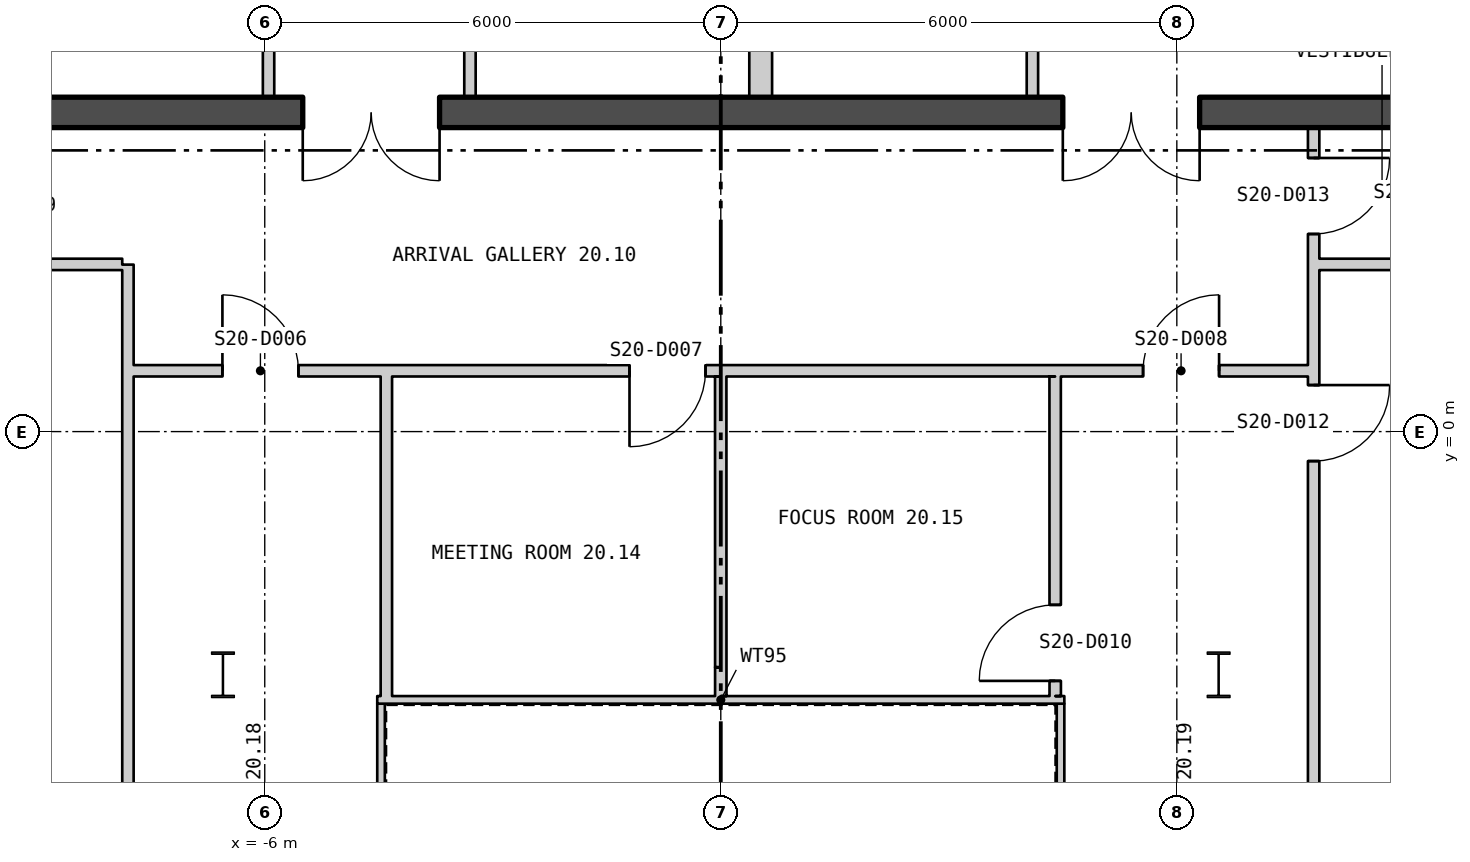
"""IFC4 building model, lengths in metres.
Left out: names, types, materials, properties, quantities, classifications, styles, units other than length and angle.
Written with IfcOpenShell. Run it as: python <this file> out.ifc"""

import sys

from ifc_helpers import new_model, si_unit, direction, frame, frame_2d, origin, origin_2d, place, context, subcontext, project, spatial, polyline, rectangle, i_section, outline, extrude, element, fill, save


model = new_model("IFC4")
c1 = context("Model", 3, precision=1e-05, world=origin(), true_north=direction((0.0, 1.0)))
c2 = subcontext(c1, "Body", "Model", "MODEL_VIEW")
j1 = project(units=[si_unit("LENGTHUNIT", "METRE"), si_unit("PLANEANGLEUNIT", "RADIAN")], contexts=[c1])
p1 = place(None, origin())
s1 = spatial("IfcSite", under=j1, at=p1, CompositionType="ELEMENT")
p2 = place(p1, origin())
s2 = spatial("IfcBuilding", under=s1, at=p2, CompositionType="ELEMENT")
p3 = place(p2, frame((0.0, 0.0, 268.8)))
s3 = spatial("IfcBuildingStorey", under=s2, at=p3, CompositionType="ELEMENT", Elevation=268.8)
for number, where, z_axis, x_axis in (
    (1, (6.55, -3.2, 0.0), (0.0, 0.0, 1.0), (1.0, 0.0, 0.0)),
    (2, (-6.55, -3.2, 0.0), (0.0, 0.0, 1.0), (1.0, 0.0, 0.0)),
):
    element("IfcColumn", number, at=place(p3, frame(where, z_axis=z_axis, x_axis=x_axis)), inside=s3, PredefinedType="COLUMN", context=c2, shape_type="SweptSolid", body=[
        extrude(i_section(OverallWidth=0.3, OverallDepth=0.6, WebThickness=0.015, FlangeThickness=0.03, at=origin_2d()), origin(), (0.0, 0.0, 1.0), 3.9),
    ])
p4 = place(p3, frame((-25.54, 15.35, -0.18), z_axis=(0.0, 0.0, 1.0), x_axis=(0.499999764979, -0.866025539474, 0.0)))
e3 = element("IfcWall", 3, at=p4, inside=s3, PredefinedType="SOLIDWALL", context=c2, shape_type="SweptSolid", body=[
    extrude(outline(polyline([(-0.13, -0.225), (45.87, -0.225), (45.61, 0.225), (0.13, 0.225), (-0.13, -0.225)])), origin(), (0.0, 0.0, 1.0), 3.68),
])
p5 = place(p4, frame((1.424, 0.0, 1.08)))
e4 = element("IfcOpeningElement", 4, at=p5, cuts=e3, PredefinedType="OPENING", context=c2, shape_type="SweptSolid", body=[
    extrude(rectangle(XDim=2.4, YDim=2.0, at=frame_2d((1.2, 1.0))), frame((0.0, 0.235, 0.0), z_axis=(0.0, -1.0, 0.0), x_axis=(1.0, 0.0, 0.0)), (0.0, 0.0, 1.0), 0.47),
])
p6 = place(p4, frame((5.893, 0.0, 1.08)))
e5 = element("IfcOpeningElement", 5, at=p6, cuts=e3, PredefinedType="OPENING", context=c2, shape_type="SweptSolid", body=[
    extrude(rectangle(XDim=2.4, YDim=2.0, at=frame_2d((1.2, 1.0))), frame((0.0, 0.235, 0.0), z_axis=(0.0, -1.0, 0.0), x_axis=(1.0, 0.0, 0.0)), (0.0, 0.0, 1.0), 0.47),
])
p7 = place(p4, frame((10.401, 0.0, 1.08)))
e6 = element("IfcOpeningElement", 6, at=p7, cuts=e3, PredefinedType="OPENING", context=c2, shape_type="SweptSolid", body=[
    extrude(rectangle(XDim=2.4, YDim=2.0, at=frame_2d((1.2, 1.0))), frame((0.0, 0.235, 0.0), z_axis=(0.0, -1.0, 0.0), x_axis=(1.0, 0.0, 0.0)), (0.0, 0.0, 1.0), 0.47),
])
p8 = place(p4, frame((14.909, 0.0, 1.08)))
e7 = element("IfcOpeningElement", 7, at=p8, cuts=e3, PredefinedType="OPENING", context=c2, shape_type="SweptSolid", body=[
    extrude(rectangle(XDim=2.4, YDim=2.0, at=frame_2d((1.2, 1.0))), frame((0.0, 0.235, 0.0), z_axis=(0.0, -1.0, 0.0), x_axis=(1.0, 0.0, 0.0)), (0.0, 0.0, 1.0), 0.47),
])
p9 = place(p4, frame((19.416, 0.0, 1.08)))
e8 = element("IfcOpeningElement", 8, at=p9, cuts=e3, PredefinedType="OPENING", context=c2, shape_type="SweptSolid", body=[
    extrude(rectangle(XDim=2.4, YDim=2.0, at=frame_2d((1.2, 1.0))), frame((0.0, 0.235, 0.0), z_axis=(0.0, -1.0, 0.0), x_axis=(1.0, 0.0, 0.0)), (0.0, 0.0, 1.0), 0.47),
])
p10 = place(p4, frame((23.924, 0.0, 1.08)))
e9 = element("IfcOpeningElement", 9, at=p10, cuts=e3, PredefinedType="OPENING", context=c2, shape_type="SweptSolid", body=[
    extrude(rectangle(XDim=2.4, YDim=2.0, at=frame_2d((1.2, 1.0))), frame((0.0, 0.235, 0.0), z_axis=(0.0, -1.0, 0.0), x_axis=(1.0, 0.0, 0.0)), (0.0, 0.0, 1.0), 0.47),
])
p11 = place(p4, frame((28.431, 0.0, 1.08)))
e10 = element("IfcOpeningElement", 10, at=p11, cuts=e3, PredefinedType="OPENING", context=c2, shape_type="SweptSolid", body=[
    extrude(rectangle(XDim=2.4, YDim=2.0, at=frame_2d((1.2, 1.0))), frame((0.0, 0.235, 0.0), z_axis=(0.0, -1.0, 0.0), x_axis=(1.0, 0.0, 0.0)), (0.0, 0.0, 1.0), 0.47),
])
p12 = place(p4, frame((32.939, 0.0, 1.08)))
e11 = element("IfcOpeningElement", 11, at=p12, cuts=e3, PredefinedType="OPENING", context=c2, shape_type="SweptSolid", body=[
    extrude(rectangle(XDim=2.4, YDim=2.0, at=frame_2d((1.2, 1.0))), frame((0.0, 0.235, 0.0), z_axis=(0.0, -1.0, 0.0), x_axis=(1.0, 0.0, 0.0)), (0.0, 0.0, 1.0), 0.47),
])
p13 = place(p4, frame((37.447, 0.0, 1.08)))
e12 = element("IfcOpeningElement", 12, at=p13, cuts=e3, PredefinedType="OPENING", context=c2, shape_type="SweptSolid", body=[
    extrude(rectangle(XDim=2.4, YDim=2.0, at=frame_2d((1.2, 1.0))), frame((0.0, 0.235, 0.0), z_axis=(0.0, -1.0, 0.0), x_axis=(1.0, 0.0, 0.0)), (0.0, 0.0, 1.0), 0.47),
])
p14 = place(p4, frame((41.916, 0.0, 1.08)))
e13 = element("IfcOpeningElement", 13, at=p14, cuts=e3, PredefinedType="OPENING", context=c2, shape_type="SweptSolid", body=[
    extrude(rectangle(XDim=2.4, YDim=2.0, at=frame_2d((1.2, 1.0))), frame((0.0, 0.235, 0.0), z_axis=(0.0, -1.0, 0.0), x_axis=(1.0, 0.0, 0.0)), (0.0, 0.0, 1.0), 0.47),
])
p15 = place(p3, frame((2.67, -24.262, -0.18), z_axis=(0.0, 0.0, 1.0), x_axis=(0.499999764979, 0.866025539474, 0.0)))
e14 = element("IfcWall", 14, at=p15, inside=s3, PredefinedType="SOLIDWALL", context=c2, shape_type="SweptSolid", body=[
    extrude(outline(polyline([(-0.13, -0.225), (45.87, -0.225), (45.61, 0.225), (0.13, 0.225), (-0.13, -0.225)])), origin(), (0.0, 0.0, 1.0), 3.68),
])
p16 = place(p15, frame((1.424, 0.0, 1.08)))
e15 = element("IfcOpeningElement", 15, at=p16, cuts=e14, PredefinedType="OPENING", context=c2, shape_type="SweptSolid", body=[
    extrude(rectangle(XDim=2.4, YDim=2.0, at=frame_2d((1.2, 1.0))), frame((0.0, 0.235, 0.0), z_axis=(0.0, -1.0, 0.0), x_axis=(1.0, 0.0, 0.0)), (0.0, 0.0, 1.0), 0.47),
])
p17 = place(p15, frame((5.893, 0.0, 1.08)))
e16 = element("IfcOpeningElement", 16, at=p17, cuts=e14, PredefinedType="OPENING", context=c2, shape_type="SweptSolid", body=[
    extrude(rectangle(XDim=2.4, YDim=2.0, at=frame_2d((1.2, 1.0))), frame((0.0, 0.235, 0.0), z_axis=(0.0, -1.0, 0.0), x_axis=(1.0, 0.0, 0.0)), (0.0, 0.0, 1.0), 0.47),
])
p18 = place(p15, frame((10.401, 0.0, 1.08)))
e17 = element("IfcOpeningElement", 17, at=p18, cuts=e14, PredefinedType="OPENING", context=c2, shape_type="SweptSolid", body=[
    extrude(rectangle(XDim=2.4, YDim=2.0, at=frame_2d((1.2, 1.0))), frame((0.0, 0.235, 0.0), z_axis=(0.0, -1.0, 0.0), x_axis=(1.0, 0.0, 0.0)), (0.0, 0.0, 1.0), 0.47),
])
p19 = place(p15, frame((14.909, 0.0, 1.08)))
e18 = element("IfcOpeningElement", 18, at=p19, cuts=e14, PredefinedType="OPENING", context=c2, shape_type="SweptSolid", body=[
    extrude(rectangle(XDim=2.4, YDim=2.0, at=frame_2d((1.2, 1.0))), frame((0.0, 0.235, 0.0), z_axis=(0.0, -1.0, 0.0), x_axis=(1.0, 0.0, 0.0)), (0.0, 0.0, 1.0), 0.47),
])
p20 = place(p15, frame((23.924, 0.0, 1.08)))
e19 = element("IfcOpeningElement", 19, at=p20, cuts=e14, PredefinedType="OPENING", context=c2, shape_type="SweptSolid", body=[
    extrude(rectangle(XDim=2.4, YDim=2.0, at=frame_2d((1.2, 1.0))), frame((0.0, 0.235, 0.0), z_axis=(0.0, -1.0, 0.0), x_axis=(1.0, 0.0, 0.0)), (0.0, 0.0, 1.0), 0.47),
])
p21 = place(p15, frame((28.431, 0.0, 1.08)))
e20 = element("IfcOpeningElement", 20, at=p21, cuts=e14, PredefinedType="OPENING", context=c2, shape_type="SweptSolid", body=[
    extrude(rectangle(XDim=2.4, YDim=2.0, at=frame_2d((1.2, 1.0))), frame((0.0, 0.235, 0.0), z_axis=(0.0, -1.0, 0.0), x_axis=(1.0, 0.0, 0.0)), (0.0, 0.0, 1.0), 0.47),
])
p22 = place(p15, frame((32.939, 0.0, 1.08)))
e21 = element("IfcOpeningElement", 21, at=p22, cuts=e14, PredefinedType="OPENING", context=c2, shape_type="SweptSolid", body=[
    extrude(rectangle(XDim=2.4, YDim=2.0, at=frame_2d((1.2, 1.0))), frame((0.0, 0.235, 0.0), z_axis=(0.0, -1.0, 0.0), x_axis=(1.0, 0.0, 0.0)), (0.0, 0.0, 1.0), 0.47),
])
p23 = place(p15, frame((37.447, 0.0, 1.08)))
e22 = element("IfcOpeningElement", 22, at=p23, cuts=e14, PredefinedType="OPENING", context=c2, shape_type="SweptSolid", body=[
    extrude(rectangle(XDim=2.4, YDim=2.0, at=frame_2d((1.2, 1.0))), frame((0.0, 0.235, 0.0), z_axis=(0.0, -1.0, 0.0), x_axis=(1.0, 0.0, 0.0)), (0.0, 0.0, 1.0), 0.47),
])
p24 = place(p15, frame((41.916, 0.0, 1.08)))
e23 = element("IfcOpeningElement", 23, at=p24, cuts=e14, PredefinedType="OPENING", context=c2, shape_type="SweptSolid", body=[
    extrude(rectangle(XDim=2.4, YDim=2.0, at=frame_2d((1.2, 1.0))), frame((0.0, 0.235, 0.0), z_axis=(0.0, -1.0, 0.0), x_axis=(1.0, 0.0, 0.0)), (0.0, 0.0, 1.0), 0.47),
])
p25 = place(p3, frame((4.47, -11.62, 0.0), z_axis=(0.0, 0.0, 1.0), x_axis=(0.0, 1.0, 0.0)))
e24 = element("IfcWall", 24, at=p25, inside=s3, PredefinedType="PARTITIONING", context=c2, shape_type="SweptSolid", body=[
    extrude(rectangle(XDim=8.04, YDim=0.1, at=frame_2d((4.02, 0.0))), origin(), (0.0, 0.0, 1.0), 3.7),
])
p26 = place(p3, frame((4.52, -3.53, 0.0), z_axis=(0.0, 0.0, 1.0), x_axis=(-1.0, 0.0, 0.0)))
e25 = element("IfcWall", 25, at=p26, inside=s3, PredefinedType="PARTITIONING", context=c2, shape_type="SweptSolid", body=[
    extrude(rectangle(XDim=9.04, YDim=0.1, at=frame_2d((4.52, 0.0))), origin(), (0.0, 0.0, 1.0), 3.7),
])
p27 = place(p3, frame((-4.47, -3.58, 0.0), z_axis=(0.0, 0.0, 1.0), x_axis=(0.0, -1.0, 0.0)))
e26 = element("IfcWall", 26, at=p27, inside=s3, PredefinedType="PARTITIONING", context=c2, shape_type="SweptSolid", body=[
    extrude(rectangle(XDim=8.04, YDim=0.1, at=frame_2d((4.02, 0.0))), origin(), (0.0, 0.0, 1.0), 3.7),
])
p28 = place(p3, frame((-14.5, 4.2, 0.0), z_axis=(0.0, 0.0, 1.0), x_axis=(1.0, 0.0, 0.0)))
e27 = element("IfcWall", 27, at=p28, inside=s3, PredefinedType="SHEAR", context=c2, shape_type="SweptSolid", body=[
    extrude(rectangle(XDim=29.0, YDim=0.4, at=frame_2d((14.5, 0.0))), origin(), (0.0, 0.0, 1.0), 3.7),
])
p29 = place(p28, frame((9.0, 0.0, 0.0)))
e28 = element("IfcOpeningElement", 28, at=p29, cuts=e27, PredefinedType="OPENING", context=c2, shape_type="SweptSolid", body=[
    extrude(rectangle(XDim=1.8, YDim=2.4, at=frame_2d((0.9, 1.2))), frame((0.0, 0.21, 0.0), z_axis=(0.0, -1.0, 0.0), x_axis=(1.0, 0.0, 0.0)), (0.0, 0.0, 1.0), 0.42),
])
p30 = place(p28, frame((19.0, 0.0, 0.0)))
e29 = element("IfcOpeningElement", 29, at=p30, cuts=e27, PredefinedType="OPENING", context=c2, shape_type="SweptSolid", body=[
    extrude(rectangle(XDim=1.8, YDim=2.4, at=frame_2d((0.9, 1.2))), frame((0.0, 0.21, 0.0), z_axis=(0.0, -1.0, 0.0), x_axis=(1.0, 0.0, 0.0)), (0.0, 0.0, 1.0), 0.42),
])
for number, where, z_axis, x_axis in (
    (30, (-5.95, 4.4, 0.0), (0.0, 0.0, 1.0), (0.0, 1.0, 0.0)),
    (31, (-3.3, 4.4, 0.0), (0.0, 0.0, 1.0), (0.0, 1.0, 0.0)),
    (32, (0.45, 4.4, 0.0), (0.0, 0.0, 1.0), (0.0, 1.0, 0.0)),
    (33, (0.6, 4.4, 0.0), (0.0, 0.0, 1.0), (0.0, 1.0, 0.0)),
    (34, (4.1, 4.4, 0.0), (0.0, 0.0, 1.0), (0.0, 1.0, 0.0)),
):
    element("IfcWall", number, at=place(p3, frame(where, z_axis=z_axis, x_axis=x_axis)), inside=s3, PredefinedType="PARTITIONING", context=c2, shape_type="SweptSolid", body=[
        extrude(rectangle(XDim=1.895, YDim=0.15, at=frame_2d((0.948, 0.0))), origin(), (0.0, 0.0, 1.0), 3.7),
    ])
p31 = place(p3, frame((-16.225, 2.2, 0.0), z_axis=(0.0, 0.0, 1.0), x_axis=(1.0, 0.0, 0.0)))
e35 = element("IfcWall", 35, at=p31, inside=s3, PredefinedType="PARTITIONING", context=c2, shape_type="SweptSolid", body=[
    extrude(rectangle(XDim=8.35, YDim=0.15, at=frame_2d((4.175, 0.0))), origin(), (0.0, 0.0, 1.0), 3.7),
])
p32 = place(p31, frame((4.431, 0.0, 0.0)))
e36 = element("IfcOpeningElement", 36, at=p32, cuts=e35, PredefinedType="OPENING", context=c2, shape_type="SweptSolid", body=[
    extrude(rectangle(XDim=1.0, YDim=2.1, at=frame_2d((0.5, 1.05))), frame((0.0, 0.085, 0.0), z_axis=(0.0, -1.0, 0.0), x_axis=(1.0, 0.0, 0.0)), (0.0, 0.0, 1.0), 0.17),
])
p33 = place(p3, frame((-7.8, -13.675, 0.0), z_axis=(0.0, 0.0, 1.0), x_axis=(0.0, 1.0, 0.0)))
e37 = element("IfcWall", 37, at=p33, inside=s3, PredefinedType="PARTITIONING", context=c2, shape_type="SweptSolid", body=[
    extrude(rectangle(XDim=15.872, YDim=0.15, at=frame_2d((7.936, 0.0))), origin(), (0.0, 0.0, 1.0), 3.7),
])
p34 = place(p33, frame((3.213, 0.0, 0.0)))
e38 = element("IfcOpeningElement", 38, at=p34, cuts=e37, PredefinedType="OPENING", context=c2, shape_type="SweptSolid", body=[
    extrude(rectangle(XDim=1.0, YDim=2.1, at=frame_2d((0.5, 1.05))), frame((0.0, 0.085, 0.0), z_axis=(0.0, -1.0, 0.0), x_axis=(1.0, 0.0, 0.0)), (0.0, 0.0, 1.0), 0.17),
])
p35 = place(p3, frame((-7.725, 0.8, 0.0), z_axis=(0.0, 0.0, 1.0), x_axis=(1.0, 0.0, 0.0)))
e39 = element("IfcWall", 39, at=p35, inside=s3, PredefinedType="PARTITIONING", context=c2, shape_type="SweptSolid", body=[
    extrude(rectangle(XDim=15.45, YDim=0.15, at=frame_2d((7.725, 0.0))), origin(), (0.0, 0.0, 1.0), 3.7),
])
p36 = place(p35, frame((1.168, 0.0, 0.0)))
e40 = element("IfcOpeningElement", 40, at=p36, cuts=e39, PredefinedType="OPENING", context=c2, shape_type="SweptSolid", body=[
    extrude(rectangle(XDim=1.0, YDim=2.1, at=frame_2d((0.5, 1.05))), frame((0.0, 0.085, 0.0), z_axis=(0.0, -1.0, 0.0), x_axis=(1.0, 0.0, 0.0)), (0.0, 0.0, 1.0), 0.17),
])
p37 = place(p35, frame((6.524, 0.0, 0.0)))
e41 = element("IfcOpeningElement", 41, at=p37, cuts=e39, PredefinedType="OPENING", context=c2, shape_type="SweptSolid", body=[
    extrude(rectangle(XDim=1.0, YDim=2.1, at=frame_2d((0.5, 1.05))), frame((0.0, 0.085, 0.0), z_axis=(0.0, -1.0, 0.0), x_axis=(1.0, 0.0, 0.0)), (0.0, 0.0, 1.0), 0.17),
])
p38 = place(p35, frame((13.281, 0.0, 0.0)))
e42 = element("IfcOpeningElement", 42, at=p38, cuts=e39, PredefinedType="OPENING", context=c2, shape_type="SweptSolid", body=[
    extrude(rectangle(XDim=1.0, YDim=2.1, at=frame_2d((0.5, 1.05))), frame((0.0, 0.085, 0.0), z_axis=(0.0, -1.0, 0.0), x_axis=(1.0, 0.0, 0.0)), (0.0, 0.0, 1.0), 0.17),
])
p39 = place(p3, frame((-4.4, -3.48, 0.0), z_axis=(0.0, 0.0, 1.0), x_axis=(0.0, 1.0, 0.0)))
e43 = element("IfcWall", 43, at=p39, inside=s3, PredefinedType="PARTITIONING", context=c2, shape_type="SweptSolid", body=[
    extrude(rectangle(XDim=4.205, YDim=0.15, at=frame_2d((2.103, 0.0))), origin(), (0.0, 0.0, 1.0), 3.7),
])
p40 = place(p3, frame((-0.001, 0.725, 0.0), z_axis=(0.0, 0.0, 1.0), x_axis=(0.000235294111, -0.999999972318, 0.0)))
e44 = element("IfcWall", 44, at=p40, inside=s3, PredefinedType="PARTITIONING", context=c2, shape_type="SweptSolid", body=[
    extrude(rectangle(XDim=3.825, YDim=0.15, at=frame_2d((1.913, 0.0))), origin(), (0.0, 0.0, 1.0), 3.2),
])
p41 = place(p3, frame((-0.0, -3.1, 0.0), z_axis=(0.0, 0.0, 1.0), x_axis=(0.000263157886, -0.999999965374, 0.0)))
e45 = element("IfcWall", 45, at=p41, inside=s3, PredefinedType="PARTITIONING", context=c2, shape_type="SweptSolid", body=[
    extrude(rectangle(XDim=0.38, YDim=0.15, at=frame_2d((0.19, 0.0))), origin(), (0.0, 0.0, 1.0), 3.7),
])
p42 = place(p3, frame((4.399, 0.725, 0.0), z_axis=(0.0, 0.0, 1.0), x_axis=(0.000237812122, -0.999999971723, 0.0)))
e46 = element("IfcWall", 46, at=p42, inside=s3, PredefinedType="PARTITIONING", context=c2, shape_type="SweptSolid", body=[
    extrude(rectangle(XDim=4.205, YDim=0.15, at=frame_2d((2.103, 0.0))), origin(), (0.0, 0.0, 1.0), 3.7),
])
p43 = place(p42, frame((3.005, 0.0, 0.0)))
e47 = element("IfcOpeningElement", 47, at=p43, cuts=e46, PredefinedType="OPENING", context=c2, shape_type="SweptSolid", body=[
    extrude(rectangle(XDim=1.0, YDim=2.1, at=frame_2d((0.5, 1.05))), frame((0.0, 0.085, 0.0), z_axis=(0.0, -1.0, 0.0), x_axis=(1.0, 0.0, 0.0)), (0.0, 0.0, 1.0), 0.17),
])
p44 = place(p3, frame((7.8, -13.675, 0.0), z_axis=(0.0, 0.0, 1.0), x_axis=(0.0, 1.0, 0.0)))
e48 = element("IfcWall", 48, at=p44, inside=s3, PredefinedType="PARTITIONING", context=c2, shape_type="SweptSolid", body=[
    extrude(rectangle(XDim=17.675, YDim=0.15, at=frame_2d((8.838, 0.0))), origin(), (0.0, 0.0, 1.0), 3.7),
])
p45 = place(p44, frame((4.552, 0.0, 0.0)))
e49 = element("IfcOpeningElement", 49, at=p45, cuts=e48, PredefinedType="OPENING", context=c2, shape_type="SweptSolid", body=[
    extrude(rectangle(XDim=1.0, YDim=2.1, at=frame_2d((0.5, 1.05))), frame((0.0, 0.085, 0.0), z_axis=(0.0, -1.0, 0.0), x_axis=(1.0, 0.0, 0.0)), (0.0, 0.0, 1.0), 0.17),
])
p46 = place(p44, frame((13.287, 0.0, 0.0)))
e50 = element("IfcOpeningElement", 50, at=p46, cuts=e48, PredefinedType="OPENING", context=c2, shape_type="SweptSolid", body=[
    extrude(rectangle(XDim=1.0, YDim=2.1, at=frame_2d((0.5, 1.05))), frame((0.0, 0.085, 0.0), z_axis=(0.0, -1.0, 0.0), x_axis=(1.0, 0.0, 0.0)), (0.0, 0.0, 1.0), 0.17),
])
p47 = place(p44, frame((16.275, 0.0, 0.0)))
e51 = element("IfcOpeningElement", 51, at=p47, cuts=e48, PredefinedType="OPENING", context=c2, shape_type="SweptSolid", body=[
    extrude(rectangle(XDim=1.0, YDim=2.1, at=frame_2d((0.5, 1.05))), frame((0.0, 0.085, 0.0), z_axis=(0.0, -1.0, 0.0), x_axis=(1.0, 0.0, 0.0)), (0.0, 0.0, 1.0), 0.17),
])
p48 = place(p3, frame((7.875, 2.2, 0.0), z_axis=(0.0, 0.0, 1.0), x_axis=(1.0, 0.0, 0.0)))
e52 = element("IfcWall", 52, at=p48, inside=s3, PredefinedType="PARTITIONING", context=c2, shape_type="SweptSolid", body=[
    extrude(rectangle(XDim=8.35, YDim=0.15, at=frame_2d((4.175, 0.0))), origin(), (0.0, 0.0, 1.0), 3.7),
])
p49 = place(p48, frame((3.662, 0.0, 0.0)))
e53 = element("IfcOpeningElement", 53, at=p49, cuts=e52, PredefinedType="OPENING", context=c2, shape_type="SweptSolid", body=[
    extrude(rectangle(XDim=1.0, YDim=2.1, at=frame_2d((0.5, 1.05))), frame((0.0, 0.085, 0.0), z_axis=(0.0, -1.0, 0.0), x_axis=(1.0, 0.0, 0.0)), (0.0, 0.0, 1.0), 0.17),
])
p50 = place(p48, frame((7.15, 0.0, 0.0)))
e54 = element("IfcOpeningElement", 54, at=p50, cuts=e52, PredefinedType="OPENING", context=c2, shape_type="SweptSolid", body=[
    extrude(rectangle(XDim=1.0, YDim=2.1, at=frame_2d((0.5, 1.05))), frame((0.0, 0.085, 0.0), z_axis=(0.0, -1.0, 0.0), x_axis=(1.0, 0.0, 0.0)), (0.0, 0.0, 1.0), 0.17),
])
p51 = place(p29, origin())
e55 = element("IfcDoor", 55, at=p51, inside=s3, OperationType="DOUBLE_DOOR_SINGLE_SWING", PredefinedType="DOOR", context=c2, shape_type="SweptSolid", body=[
    extrude(rectangle(XDim=1.8, YDim=2.4, at=frame_2d((0.9, 1.2))), frame((0.0, 0.025, 0.0), z_axis=(0.0, -1.0, 0.0), x_axis=(1.0, 0.0, 0.0)), (0.0, 0.0, 1.0), 0.05),
])
fill(e28, e55)
p52 = place(p30, origin())
e56 = element("IfcDoor", 56, at=p52, inside=s3, OperationType="DOUBLE_DOOR_SINGLE_SWING", PredefinedType="DOOR", context=c2, shape_type="SweptSolid", body=[
    extrude(rectangle(XDim=1.8, YDim=2.4, at=frame_2d((0.9, 1.2))), frame((0.0, 0.025, 0.0), z_axis=(0.0, -1.0, 0.0), x_axis=(1.0, 0.0, 0.0)), (0.0, 0.0, 1.0), 0.05),
])
fill(e29, e56)
p53 = place(p36, origin())
e57 = element("IfcDoor", 57, at=p53, inside=s3, OperationType="SINGLE_SWING_RIGHT", PredefinedType="DOOR", context=c2, shape_type="SweptSolid", body=[
    extrude(rectangle(XDim=1.0, YDim=2.1, at=frame_2d((0.5, 1.05))), frame((0.0, 0.025, 0.0), z_axis=(0.0, -1.0, 0.0), x_axis=(1.0, 0.0, 0.0)), (0.0, 0.0, 1.0), 0.05),
])
fill(e40, e57)
p54 = place(p37, origin())
e58 = element("IfcDoor", 58, at=p54, inside=s3, OperationType="SINGLE_SWING_LEFT", PredefinedType="DOOR", context=c2, shape_type="SweptSolid", body=[
    extrude(rectangle(XDim=1.0, YDim=2.1, at=frame_2d((0.5, 1.05))), frame((0.0, 0.025, 0.0), z_axis=(0.0, -1.0, 0.0), x_axis=(1.0, 0.0, 0.0)), (0.0, 0.0, 1.0), 0.05),
])
fill(e41, e58)
p55 = place(p38, origin())
e59 = element("IfcDoor", 59, at=p55, inside=s3, OperationType="SINGLE_SWING_LEFT", PredefinedType="DOOR", context=c2, shape_type="SweptSolid", body=[
    extrude(rectangle(XDim=1.0, YDim=2.1, at=frame_2d((0.5, 1.05))), frame((0.0, 0.025, 0.0), z_axis=(0.0, -1.0, 0.0), x_axis=(1.0, 0.0, 0.0)), (0.0, 0.0, 1.0), 0.05),
])
fill(e42, e59)
p56 = place(p43, origin())
e60 = element("IfcDoor", 60, at=p56, inside=s3, OperationType="SINGLE_SWING_RIGHT", PredefinedType="DOOR", context=c2, shape_type="SweptSolid", body=[
    extrude(rectangle(XDim=1.0, YDim=2.1, at=frame_2d((0.5, 1.05))), frame((0.0, 0.025, 0.0), z_axis=(0.0, -1.0, 0.0), x_axis=(1.0, 0.0, 0.0)), (0.0, 0.0, 1.0), 0.05),
])
fill(e47, e60)
p57 = place(p46, origin())
e61 = element("IfcDoor", 61, at=p57, inside=s3, OperationType="SINGLE_SWING_RIGHT", PredefinedType="DOOR", context=c2, shape_type="SweptSolid", body=[
    extrude(rectangle(XDim=1.0, YDim=2.1, at=frame_2d((0.5, 1.05))), frame((0.0, 0.025, 0.0), z_axis=(0.0, -1.0, 0.0), x_axis=(1.0, 0.0, 0.0)), (0.0, 0.0, 1.0), 0.05),
])
fill(e50, e61)
p58 = place(p47, origin())
e62 = element("IfcDoor", 62, at=p58, inside=s3, OperationType="SINGLE_SWING_RIGHT", PredefinedType="DOOR", context=c2, shape_type="SweptSolid", body=[
    extrude(rectangle(XDim=1.0, YDim=2.1, at=frame_2d((0.5, 1.05))), frame((0.0, 0.025, 0.0), z_axis=(0.0, -1.0, 0.0), x_axis=(1.0, 0.0, 0.0)), (0.0, 0.0, 1.0), 0.05),
])
fill(e51, e62)
save(model, sys.argv[1])
